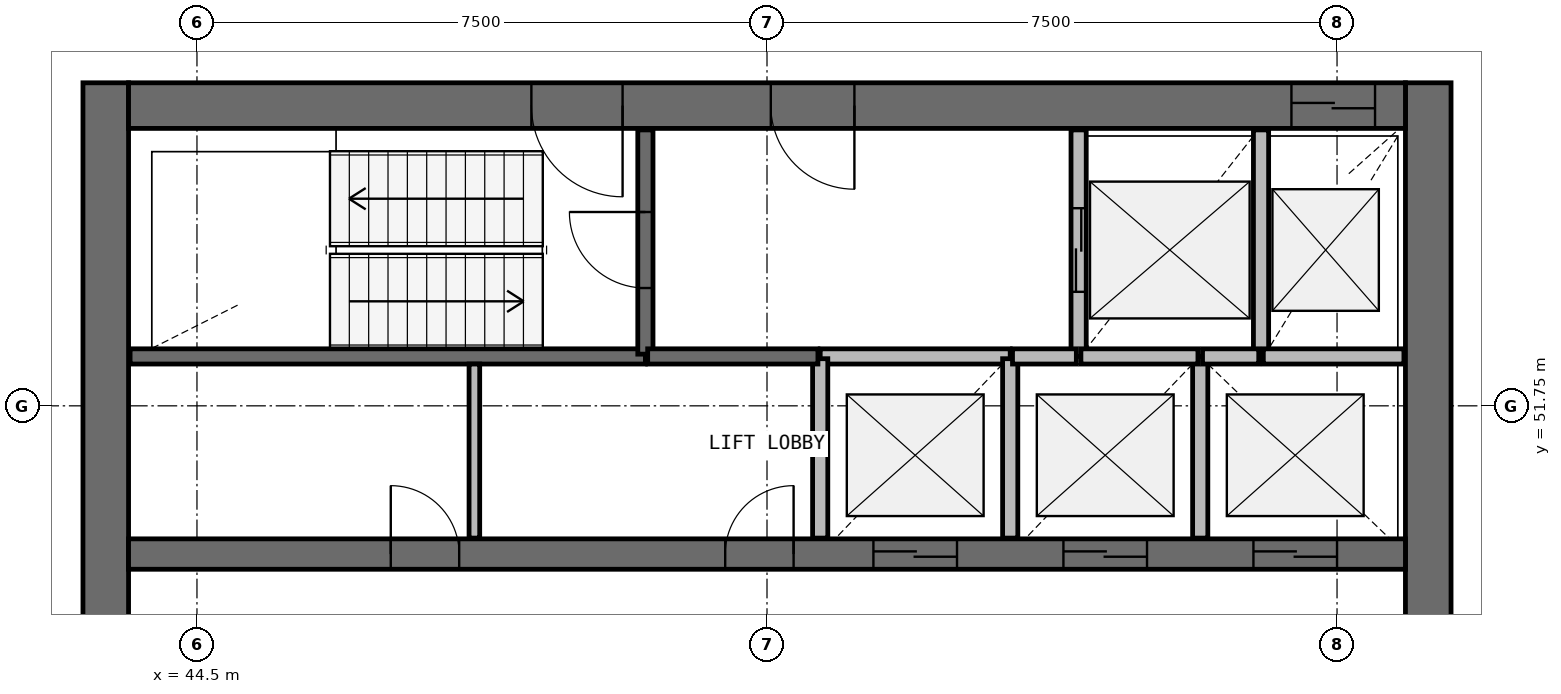
"""IFC4 building model, lengths in metres.
Left out: names, types, materials, properties, quantities, classifications, styles, units other than length and angle.
Written with IfcOpenShell. Run it as: python <this file> out.ifc"""

import sys

from ifc_helpers import new_model, si_unit, direction, frame, frame_2d, origin, place, context, subcontext, project, spatial, rectangle, extrude, source, transform, mapped, element, fill, save


model = new_model("IFC4")
c1 = context("Model", 3, precision=1e-05, world=origin(), true_north=direction((0.0, 1.0)))
c2 = subcontext(c1, "Body", "Model", "MODEL_VIEW")
j1 = project(units=[si_unit("LENGTHUNIT", "METRE"), si_unit("PLANEANGLEUNIT", "RADIAN")], contexts=[c1])
p1 = place(None, origin())
s1 = spatial("IfcSite", under=j1, at=p1, CompositionType="ELEMENT")
p2 = place(p1, origin())
s2 = spatial("IfcBuilding", under=s1, at=p2, CompositionType="ELEMENT")
p3 = place(p2, frame((0.0, 0.0, 246.2)))
s3 = spatial("IfcBuildingStorey", under=s2, at=p3, CompositionType="ELEMENT", Elevation=246.2)
p4 = place(p3, frame((60.7, 40.0, 0.0), z_axis=(0.0, 0.0, 1.0), x_axis=(0.0, 1.0, 0.0)))
e1 = element("IfcWall", 1, at=p4, inside=s3, PredefinedType="SHEAR", context=c2, shape_type="SweptSolid", body=[
    extrude(rectangle(XDim=16.0, YDim=0.6, at=frame_2d((8.0, 0.0))), origin(), (0.0, 0.0, 1.0), 3.9),
])
p5 = place(p4, frame((7.1, 0.0, 0.0)))
e2 = element("IfcOpeningElement", 2, at=p5, cuts=e1, PredefinedType="OPENING", context=c2, shape_type="SweptSolid", body=[
    extrude(rectangle(XDim=1.8, YDim=2.1, at=frame_2d((0.9, 1.05))), frame((0.0, 0.31, 0.0), z_axis=(0.0, -1.0, 0.0), x_axis=(1.0, 0.0, 0.0)), (0.0, 0.0, 1.0), 0.62),
])
p6 = place(p3, frame((43.3, 56.0, 0.0), z_axis=(0.0, 0.0, 1.0), x_axis=(0.0, -1.0, 0.0)))
e3 = element("IfcWall", 3, at=p6, inside=s3, PredefinedType="SHEAR", context=c2, shape_type="SweptSolid", body=[
    extrude(rectangle(XDim=16.0, YDim=0.6, at=frame_2d((8.0, 0.0))), origin(), (0.0, 0.0, 1.0), 3.9),
])
p7 = place(p6, frame((7.1, 0.0, 0.0)))
e4 = element("IfcOpeningElement", 4, at=p7, cuts=e3, PredefinedType="OPENING", context=c2, shape_type="SweptSolid", body=[
    extrude(rectangle(XDim=1.8, YDim=2.1, at=frame_2d((0.9, 1.05))), frame((0.0, 0.31, 0.0), z_axis=(0.0, -1.0, 0.0), x_axis=(1.0, 0.0, 0.0)), (0.0, 0.0, 1.0), 0.62),
])
p8 = place(p3, frame((60.4, 55.7, 0.0), z_axis=(0.0, 0.0, 1.0), x_axis=(-1.0, 0.0, 0.0)))
e5 = element("IfcWall", 5, at=p8, inside=s3, PredefinedType="SHEAR", context=c2, shape_type="SweptSolid", body=[
    extrude(rectangle(XDim=16.8, YDim=0.6, at=frame_2d((8.4, 0.0))), origin(), (0.0, 0.0, 1.0), 3.9),
])
p9 = place(p8, frame((0.4, 0.0, 0.0)))
e6 = element("IfcOpeningElement", 6, at=p9, cuts=e5, PredefinedType="OPENING", context=c2, shape_type="SweptSolid", body=[
    extrude(rectangle(XDim=1.1, YDim=2.1, at=frame_2d((0.55, 1.05))), frame((0.0, 0.31, 0.0), z_axis=(0.0, -1.0, 0.0), x_axis=(1.0, 0.0, 0.0)), (0.0, 0.0, 1.0), 0.62),
])
p10 = place(p8, frame((10.3, 0.0, 0.0)))
e7 = element("IfcOpeningElement", 7, at=p10, cuts=e5, PredefinedType="OPENING", context=c2, shape_type="SweptSolid", body=[
    extrude(rectangle(XDim=1.2, YDim=2.1, at=frame_2d((0.6, 1.05))), frame((0.0, 0.31, 0.0), z_axis=(0.0, -1.0, 0.0), x_axis=(1.0, 0.0, 0.0)), (0.0, 0.0, 1.0), 0.62),
])
p11 = place(p8, frame((7.25, 0.0, 0.0)))
e8 = element("IfcOpeningElement", 8, at=p11, cuts=e5, PredefinedType="OPENING", context=c2, shape_type="SweptSolid", body=[
    extrude(rectangle(XDim=1.1, YDim=2.1, at=frame_2d((0.55, 1.05))), frame((0.0, 0.31, 0.0), z_axis=(0.0, -1.0, 0.0), x_axis=(1.0, 0.0, 0.0)), (0.0, 0.0, 1.0), 0.62),
])
p12 = place(p3, frame((43.6, 49.8, 0.0), z_axis=(0.0, 0.0, 1.0), x_axis=(1.0, 0.0, 0.0)))
e9 = element("IfcWall", 9, at=p12, inside=s3, PredefinedType="SHEAR", context=c2, shape_type="SweptSolid", body=[
    extrude(rectangle(XDim=16.8, YDim=0.4, at=frame_2d((8.4, 0.0))), origin(), (0.0, 0.0, 1.0), 3.9),
])
p13 = place(p12, frame((9.8, 0.0, 0.0)))
e10 = element("IfcOpeningElement", 10, at=p13, cuts=e9, PredefinedType="OPENING", context=c2, shape_type="SweptSolid", body=[
    extrude(rectangle(XDim=1.1, YDim=2.1, at=frame_2d((0.55, 1.05))), frame((0.0, 0.21, 0.0), z_axis=(0.0, -1.0, 0.0), x_axis=(1.0, 0.0, 0.0)), (0.0, 0.0, 1.0), 0.42),
])
p14 = place(p12, frame((12.3, 0.0, 0.0)))
e11 = element("IfcOpeningElement", 11, at=p14, cuts=e9, PredefinedType="OPENING", context=c2, shape_type="SweptSolid", body=[
    extrude(rectangle(XDim=1.1, YDim=2.1, at=frame_2d((0.55, 1.05))), frame((0.0, 0.21, 0.0), z_axis=(0.0, -1.0, 0.0), x_axis=(1.0, 0.0, 0.0)), (0.0, 0.0, 1.0), 0.42),
])
p15 = place(p12, frame((14.8, 0.0, 0.0)))
e12 = element("IfcOpeningElement", 12, at=p15, cuts=e9, PredefinedType="OPENING", context=c2, shape_type="SweptSolid", body=[
    extrude(rectangle(XDim=1.1, YDim=2.1, at=frame_2d((0.55, 1.05))), frame((0.0, 0.21, 0.0), z_axis=(0.0, -1.0, 0.0), x_axis=(1.0, 0.0, 0.0)), (0.0, 0.0, 1.0), 0.42),
])
p16 = place(p12, frame((3.45, 0.0, 0.0)))
e13 = element("IfcOpeningElement", 13, at=p16, cuts=e9, PredefinedType="OPENING", context=c2, shape_type="SweptSolid", body=[
    extrude(rectangle(XDim=0.9, YDim=2.1, at=frame_2d((0.45, 1.05))), frame((0.0, 0.21, 0.0), z_axis=(0.0, -1.0, 0.0), x_axis=(1.0, 0.0, 0.0)), (0.0, 0.0, 1.0), 0.42),
])
p17 = place(p12, frame((7.85, 0.0, 0.0)))
e14 = element("IfcOpeningElement", 14, at=p17, cuts=e9, PredefinedType="OPENING", context=c2, shape_type="SweptSolid", body=[
    extrude(rectangle(XDim=0.9, YDim=2.1, at=frame_2d((0.45, 1.05))), frame((0.0, 0.21, 0.0), z_axis=(0.0, -1.0, 0.0), x_axis=(1.0, 0.0, 0.0)), (0.0, 0.0, 1.0), 0.42),
])
p18 = place(p3, frame((43.62, 52.4, 0.0), z_axis=(0.0, 0.0, 1.0), x_axis=(1.0, 0.0, 0.0)))
e15 = element("IfcWall", 15, at=p18, inside=s3, PredefinedType="SOLIDWALL", context=c2, shape_type="SweptSolid", body=[
    extrude(rectangle(XDim=6.78, YDim=0.2, at=frame_2d((3.39, 0.0))), origin(), (0.0, 0.0, 1.0), 3.58),
])
p19 = place(p3, frame((50.4, 52.43, 0.0), z_axis=(0.0, 0.0, 1.0), x_axis=(0.0, 1.0, 0.0)))
e16 = element("IfcWall", 16, at=p19, inside=s3, PredefinedType="SOLIDWALL", context=c2, shape_type="SweptSolid", body=[
    extrude(rectangle(XDim=2.95, YDim=0.2, at=frame_2d((1.475, 0.0))), origin(), (0.0, 0.0, 1.0), 3.58),
])
p20 = place(p19, frame((0.87, 0.0, 0.0)))
e17 = element("IfcOpeningElement", 17, at=p20, cuts=e16, PredefinedType="OPENING", context=c2, shape_type="SweptSolid", body=[
    extrude(rectangle(XDim=1.0, YDim=2.1, at=frame_2d((0.5, 1.05))), frame((0.0, 0.11, 0.0), z_axis=(0.0, -1.0, 0.0), x_axis=(1.0, 0.0, 0.0)), (0.0, 0.0, 1.0), 0.22),
])
p21 = place(p3, frame((56.1, 55.38, 0.0), z_axis=(0.0, 0.0, 1.0), x_axis=(0.0, -1.0, 0.0)))
e18 = element("IfcWall", 18, at=p21, inside=s3, PredefinedType="SOLIDWALL", context=c2, shape_type="SweptSolid", body=[
    extrude(rectangle(XDim=2.98, YDim=0.2, at=frame_2d((1.49, 0.0))), origin(), (0.0, 0.0, 1.0), 3.58),
])
p22 = place(p21, frame((1.03, 0.0, 0.0)))
e19 = element("IfcOpeningElement", 19, at=p22, cuts=e18, PredefinedType="OPENING", context=c2, shape_type="SweptSolid", body=[
    extrude(rectangle(XDim=1.1, YDim=2.1, at=frame_2d((0.55, 1.05))), frame((0.0, 0.11, 0.0), z_axis=(0.0, -1.0, 0.0), x_axis=(1.0, 0.0, 0.0)), (0.0, 0.0, 1.0), 0.22),
])
p23 = place(p3, frame((58.5, 52.4, 0.0), z_axis=(0.0, 0.0, 1.0), x_axis=(0.0, 1.0, 0.0)))
e20 = element("IfcWall", 20, at=p23, inside=s3, PredefinedType="SOLIDWALL", context=c2, shape_type="SweptSolid", body=[
    extrude(rectangle(XDim=2.98, YDim=0.2, at=frame_2d((1.49, 0.0))), origin(), (0.0, 0.0, 1.0), 3.58),
])
p24 = place(p3, frame((55.2, 52.4, 0.0), z_axis=(0.0, 0.0, 1.0), x_axis=(-1.0, 0.0, 0.0)))
e21 = element("IfcWall", 21, at=p24, inside=s3, PredefinedType="SOLIDWALL", context=c2, shape_type="SweptSolid", body=[
    extrude(rectangle(XDim=2.5, YDim=0.2, at=frame_2d((1.25, 0.0))), origin(), (0.0, 0.0, 1.0), 3.58),
])
for number, where, z_axis, x_axis in (
    (22, (52.7, 52.37, 0.0), (0.0, 0.0, 1.0), (0.0, -1.0, 0.0)),
    (23, (55.2, 50.01, 0.0), (0.0, 0.0, 1.0), (0.0, 1.0, 0.0)),
):
    element("IfcWall", number, at=place(p3, frame(where, z_axis=z_axis, x_axis=x_axis)), inside=s3, PredefinedType="SOLIDWALL", context=c2, shape_type="SweptSolid", body=[
        extrude(rectangle(XDim=2.36, YDim=0.2, at=frame_2d((1.18, 0.0))), origin(), (0.0, 0.0, 1.0), 3.58),
    ])
p25 = place(p3, frame((57.7, 50.01, 0.0), z_axis=(0.0, 0.0, 1.0), x_axis=(0.0, 1.0, 0.0)))
e24 = element("IfcWall", 24, at=p25, inside=s3, PredefinedType="SOLIDWALL", context=c2, shape_type="SweptSolid", body=[
    extrude(rectangle(XDim=2.39, YDim=0.2, at=frame_2d((1.195, 0.0))), origin(), (0.0, 0.0, 1.0), 3.58),
])
p26 = place(p3, frame((50.43, 52.4, 0.0), z_axis=(0.0, 0.0, 1.0), x_axis=(1.0, 0.0, 0.0)))
e25 = element("IfcWall", 25, at=p26, inside=s3, PredefinedType="SOLIDWALL", context=c2, shape_type="SweptSolid", body=[
    extrude(rectangle(XDim=2.24, YDim=0.2, at=frame_2d((1.12, 0.0))), origin(), (0.0, 0.0, 1.0), 3.58),
])
p27 = place(p3, frame((60.38, 52.4, 0.0), z_axis=(0.0, 0.0, 1.0), x_axis=(-1.0, 0.0, 0.0)))
e26 = element("IfcWall", 26, at=p27, inside=s3, PredefinedType="SOLIDWALL", context=c2, shape_type="SweptSolid", body=[
    extrude(rectangle(XDim=1.85, YDim=0.2, at=frame_2d((0.925, 0.0))), origin(), (0.0, 0.0, 1.0), 3.58),
])
p28 = place(p3, frame((57.67, 52.4, 0.0), z_axis=(0.0, 0.0, 1.0), x_axis=(-1.0, 0.0, 0.0)))
e27 = element("IfcWall", 27, at=p28, inside=s3, PredefinedType="SOLIDWALL", context=c2, shape_type="SweptSolid", body=[
    extrude(rectangle(XDim=1.54, YDim=0.2, at=frame_2d((0.77, 0.0))), origin(), (0.0, 0.0, 1.0), 3.58),
])
p29 = place(p3, frame((56.07, 52.4, 0.0), z_axis=(0.0, 0.0, 1.0), x_axis=(-1.0, 0.0, 0.0)))
e28 = element("IfcWall", 28, at=p29, inside=s3, PredefinedType="SOLIDWALL", context=c2, shape_type="SweptSolid", body=[
    extrude(rectangle(XDim=0.84, YDim=0.2, at=frame_2d((0.42, 0.0))), origin(), (0.0, 0.0, 1.0), 3.58),
])
p30 = place(p3, frame((58.47, 52.4, 0.0), z_axis=(0.0, 0.0, 1.0), x_axis=(-1.0, 0.0, 0.0)))
e29 = element("IfcWall", 29, at=p30, inside=s3, PredefinedType="SOLIDWALL", context=c2, shape_type="SweptSolid", body=[
    extrude(rectangle(XDim=0.74, YDim=0.2, at=frame_2d((0.37, 0.0))), origin(), (0.0, 0.0, 1.0), 3.58),
])
p31 = place(p3, frame((48.15, 50.01, 0.0), z_axis=(0.0, 0.0, 1.0), x_axis=(0.0, 1.0, 0.0)))
e30 = element("IfcWall", 30, at=p31, inside=s3, PredefinedType="PARTITIONING", context=c2, shape_type="SweptSolid", body=[
    extrude(rectangle(XDim=2.29, YDim=0.14, at=frame_2d((1.145, 0.0))), origin(), (0.0, 0.0, 1.0), 2.88),
])
m1 = source(origin(), c2, "Body", "SweptSolid", [
    extrude(rectangle(XDim=1.1, YDim=2.1, at=frame_2d((0.55, 1.05))), frame((0.0, 0.025, 0.0), z_axis=(0.0, -1.0, 0.0), x_axis=(1.0, 0.0, 0.0)), (0.0, 0.0, 1.0), 0.05),
])
p32 = place(p13, origin())
e31 = element("IfcDoor", 31, at=p32, inside=s3, OperationType="DOUBLE_DOOR_SLIDING", PredefinedType="USERDEFINED", context=c2, shape_type="MappedRepresentation", body=[
    mapped(m1, transform((0.0, 0.0, 0.0), scale=1.0)),
])
fill(e10, e31)
p33 = place(p14, origin())
e32 = element("IfcDoor", 32, at=p33, inside=s3, OperationType="DOUBLE_DOOR_SLIDING", PredefinedType="USERDEFINED", context=c2, shape_type="MappedRepresentation", body=[
    mapped(m1, transform((0.0, 0.0, 0.0), scale=1.0)),
])
fill(e11, e32)
p34 = place(p15, origin())
e33 = element("IfcDoor", 33, at=p34, inside=s3, OperationType="DOUBLE_DOOR_SLIDING", PredefinedType="USERDEFINED", context=c2, shape_type="MappedRepresentation", body=[
    mapped(m1, transform((0.0, 0.0, 0.0), scale=1.0)),
])
fill(e12, e33)
p35 = place(p22, origin())
e34 = element("IfcDoor", 34, at=p35, inside=s3, OperationType="DOUBLE_DOOR_SLIDING", PredefinedType="USERDEFINED", context=c2, shape_type="MappedRepresentation", body=[
    mapped(m1, transform((0.0, 0.0, 0.0), scale=1.0)),
])
fill(e19, e34)
p36 = place(p9, origin())
e35 = element("IfcDoor", 35, at=p36, inside=s3, OperationType="DOUBLE_DOOR_SLIDING", PredefinedType="USERDEFINED", context=c2, shape_type="MappedRepresentation", body=[
    mapped(m1, transform((0.0, 0.0, 0.0), scale=1.0)),
])
fill(e6, e35)
m2 = source(origin(), c2, "Body", "SweptSolid", [
    extrude(rectangle(XDim=1.2, YDim=2.1, at=frame_2d((0.6, 1.05))), frame((0.0, 0.025, 0.0), z_axis=(0.0, -1.0, 0.0), x_axis=(1.0, 0.0, 0.0)), (0.0, 0.0, 1.0), 0.05),
])
p37 = place(p10, origin())
e36 = element("IfcDoor", 36, at=p37, inside=s3, OperationType="SINGLE_SWING_LEFT", PredefinedType="DOOR", context=c2, shape_type="MappedRepresentation", body=[
    mapped(m2, transform((0.0, 0.0, 0.0), scale=1.0)),
])
fill(e7, e36)
m3 = source(origin(), c2, "Body", "SweptSolid", [
    extrude(rectangle(XDim=1.0, YDim=2.1, at=frame_2d((0.5, 1.05))), frame((0.0, 0.025, 0.0), z_axis=(0.0, -1.0, 0.0), x_axis=(1.0, 0.0, 0.0)), (0.0, 0.0, 1.0), 0.05),
])
p38 = place(p20, origin())
e37 = element("IfcDoor", 37, at=p38, inside=s3, OperationType="SINGLE_SWING_RIGHT", PredefinedType="DOOR", context=c2, shape_type="MappedRepresentation", body=[
    mapped(m3, transform((0.0, 0.0, 0.0), scale=1.0)),
])
fill(e17, e37)
m4 = source(origin(), c2, "Body", "SweptSolid", [
    extrude(rectangle(XDim=1.1, YDim=2.1, at=frame_2d((0.55, 1.05))), frame((0.0, 0.025, 0.0), z_axis=(0.0, -1.0, 0.0), x_axis=(1.0, 0.0, 0.0)), (0.0, 0.0, 1.0), 0.05),
])
p39 = place(p11, origin())
e38 = element("IfcDoor", 38, at=p39, inside=s3, OperationType="SINGLE_SWING_LEFT", PredefinedType="DOOR", context=c2, shape_type="MappedRepresentation", body=[
    mapped(m4, transform((0.0, 0.0, 0.0), scale=1.0)),
])
fill(e8, e38)
m5 = source(origin(), c2, "Body", "SweptSolid", [
    extrude(rectangle(XDim=0.9, YDim=2.1, at=frame_2d((0.45, 1.05))), frame((0.0, 0.025, 0.0), z_axis=(0.0, -1.0, 0.0), x_axis=(1.0, 0.0, 0.0)), (0.0, 0.0, 1.0), 0.05),
])
p40 = place(p16, origin())
e39 = element("IfcDoor", 39, at=p40, inside=s3, OperationType="SINGLE_SWING_LEFT", PredefinedType="DOOR", context=c2, shape_type="MappedRepresentation", body=[
    mapped(m5, transform((0.0, 0.0, 0.0), scale=1.0)),
])
fill(e13, e39)
p41 = place(p17, origin())
e40 = element("IfcDoor", 40, at=p41, inside=s3, OperationType="SINGLE_SWING_RIGHT", PredefinedType="DOOR", context=c2, shape_type="MappedRepresentation", body=[
    mapped(m5, transform((0.0, 0.0, 0.0), scale=1.0)),
])
fill(e14, e40)
save(model, sys.argv[1])
